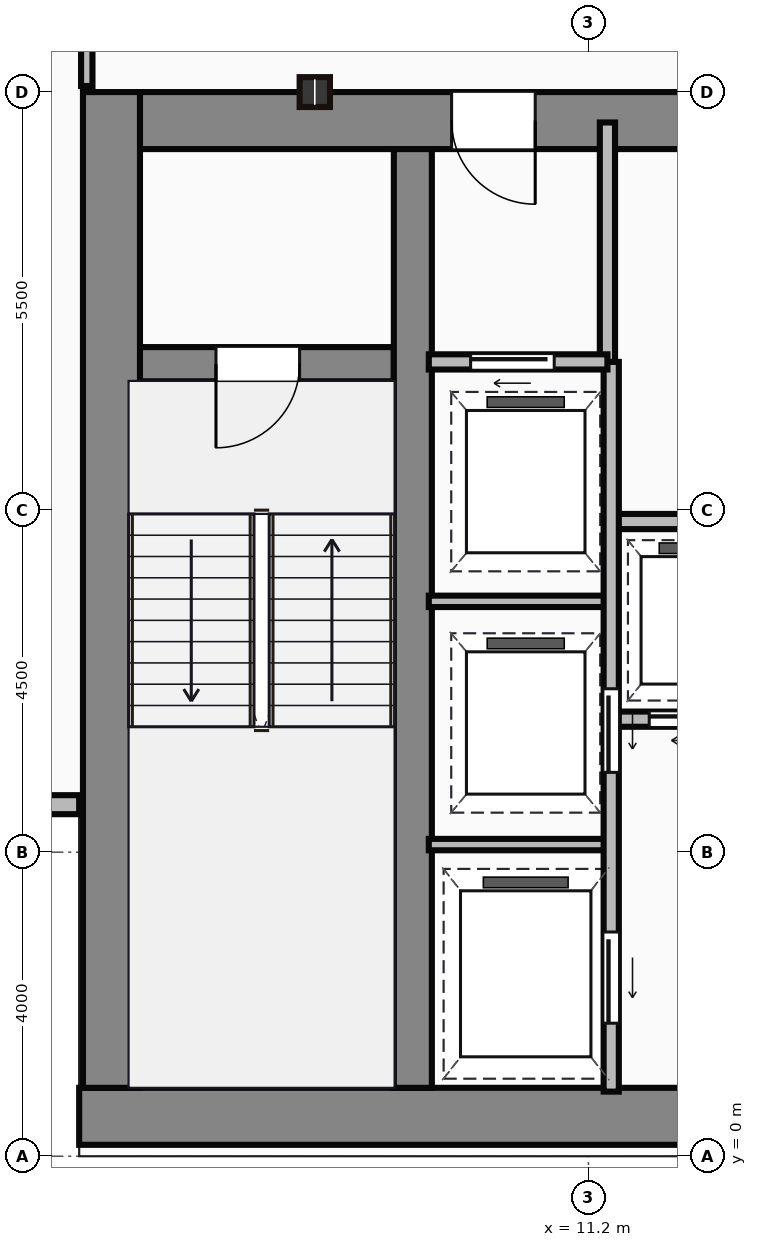
"""IFC4 building model, lengths in metres.
Left out: names, types, materials, properties, quantities, classifications, styles, units other than length and angle.
Written with IfcOpenShell. Run it as: python <this file> out.ifc"""

import sys

from ifc_helpers import new_model, si_unit, direction, frame, frame_2d, origin, origin_2d, place, context, subcontext, project, spatial, rectangle, i_section, extrude, source, transform, mapped, element, fill, save


model = new_model("IFC4")
c1 = context("Model", 3, precision=1e-05, world=origin(), true_north=direction((0.0, 1.0)))
c2 = subcontext(c1, "Body", "Model", "MODEL_VIEW")
j1 = project(units=[si_unit("LENGTHUNIT", "METRE"), si_unit("PLANEANGLEUNIT", "RADIAN")], contexts=[c1])
p1 = place(None, origin())
s1 = spatial("IfcSite", under=j1, at=p1, CompositionType="ELEMENT")
p2 = place(p1, origin())
s2 = spatial("IfcBuilding", under=s1, at=p2, CompositionType="ELEMENT")
p3 = place(p2, frame((0.0, 0.0, 125.15)))
s3 = spatial("IfcBuildingStorey", under=s2, at=p3, CompositionType="ELEMENT", Elevation=125.15)
m1 = source(origin(), c2, "Body", "SweptSolid", [
    extrude(rectangle(XDim=29.5, YDim=0.75, at=frame_2d((14.75, 0.0))), origin(), (0.0, 0.0, 1.0), 3.65),
])
p4 = place(p3, frame((4.5, 0.525, 0.0), z_axis=(0.0, 0.0, 1.0), x_axis=(1.0, 0.0, 0.0)))
e1 = element("IfcWall", 1, at=p4, inside=s3, PredefinedType="SHEAR", context=c2, shape_type="MappedRepresentation", body=[
    mapped(m1, transform((0.0, 0.0, 0.0))),
])
m2 = source(origin(), c2, "Body", "SweptSolid", [
    extrude(rectangle(XDim=13.1, YDim=0.75, at=frame_2d((6.55, 0.0))), origin(), (0.0, 0.0, 1.0), 3.65),
])
p5 = place(p3, frame((4.925, 0.9, 0.0), z_axis=(0.0, 0.0, 1.0), x_axis=(0.0, 1.0, 0.0)))
e2 = element("IfcWall", 2, at=p5, inside=s3, PredefinedType="SHEAR", context=c2, shape_type="MappedRepresentation", body=[
    mapped(m2, transform((0.0, 0.0, 0.0))),
])
m3 = source(origin(), c2, "Body", "SweptSolid", [
    extrude(rectangle(XDim=9.1, YDim=0.75, at=frame_2d((4.55, 0.0))), origin(), (0.0, 0.0, 1.0), 3.65),
])
p6 = place(p3, frame((5.3, 13.625, 0.0), z_axis=(0.0, 0.0, 1.0), x_axis=(1.0, 0.0, 0.0)))
e3 = element("IfcWall", 3, at=p6, inside=s3, PredefinedType="SHEAR", context=c2, shape_type="MappedRepresentation", body=[
    mapped(m3, transform((0.0, 0.0, 0.0))),
])
p7 = place(p6, frame((4.1, 0.0, 0.0)))
e4 = element("IfcOpeningElement", 4, at=p7, cuts=e3, PredefinedType="OPENING", context=c2, shape_type="SweptSolid", body=[
    extrude(rectangle(XDim=1.1, YDim=2.15, at=frame_2d((0.55, 1.075))), frame((0.0, 0.385, 0.0), z_axis=(0.0, -1.0, 0.0), x_axis=(1.0, 0.0, 0.0)), (0.0, 0.0, 1.0), 0.77),
])
m4 = source(origin(), c2, "Body", "SweptSolid", [
    extrude(rectangle(XDim=12.35, YDim=0.5, at=frame_2d((6.175, 0.0))), origin(), (0.0, 0.0, 1.0), 3.65),
])
p8 = place(p3, frame((8.89, 0.9, 0.0), z_axis=(0.0, 0.0, 1.0), x_axis=(0.0, 1.0, 0.0)))
e5 = element("IfcWall", 5, at=p8, inside=s3, PredefinedType="SHEAR", context=c2, shape_type="MappedRepresentation", body=[
    mapped(m4, transform((0.0, 0.0, 0.0))),
])
m5 = source(origin(), c2, "Body", "SweptSolid", [
    extrude(rectangle(XDim=3.39, YDim=0.45, at=frame_2d((1.695, 0.0))), origin(), (0.0, 0.0, 1.0), 3.65),
])
p9 = place(p3, frame((5.25, 10.42, 0.0), z_axis=(0.0, 0.0, 1.0), x_axis=(1.0, 0.0, 0.0)))
e6 = element("IfcWall", 6, at=p9, inside=s3, PredefinedType="SHEAR", context=c2, shape_type="MappedRepresentation", body=[
    mapped(m5, transform((0.0, 0.0, 0.0))),
])
p10 = place(p9, frame((1.05, 0.0, 0.0)))
e7 = element("IfcOpeningElement", 7, at=p10, cuts=e6, PredefinedType="OPENING", context=c2, shape_type="SweptSolid", body=[
    extrude(rectangle(XDim=1.1, YDim=2.15, at=frame_2d((0.55, 1.075))), frame((0.0, 0.235, 0.0), z_axis=(0.0, -1.0, 0.0), x_axis=(1.0, 0.0, 0.0)), (0.0, 0.0, 1.0), 0.47),
])
m6 = source(origin(), c2, "Body", "SweptSolid", [
    extrude(i_section(OverallWidth=0.399, OverallDepth=0.393, WebThickness=0.023, FlangeThickness=0.037, at=origin_2d()), origin(), (0.0, 0.0, 1.0), 3.65),
])
p11 = place(p3, frame((7.6, 14.0, 0.0), z_axis=(0.0, 0.0, 1.0), x_axis=(1.0, 0.0, 0.0)))
e8 = element("IfcColumn", 8, at=p11, inside=s3, PredefinedType="COLUMN", context=c2, shape_type="MappedRepresentation", body=[
    mapped(m6, transform((0.0, 0.0, 0.0))),
])
m7 = source(origin(), c2, "Body", "SweptSolid", [
    extrude(rectangle(XDim=4.5, YDim=0.25, at=frame_2d((2.25, 0.0))), origin(), (0.0, 0.0, 1.0), 3.4),
])
p12 = place(p3, frame((0.0, 4.625, 0.0), z_axis=(0.0, 0.0, 1.0), x_axis=(1.0, 0.0, 0.0)))
e9 = element("IfcWall", 9, at=p12, inside=s3, PredefinedType="STANDARD", context=c2, shape_type="MappedRepresentation", body=[
    mapped(m7, transform((0.0, 0.0, 0.0))),
])
m8 = source(origin(), c2, "Body", "SweptSolid", [
    extrude(rectangle(XDim=3.18, YDim=0.2, at=frame_2d((1.59, 0.0))), origin(), (0.0, 0.0, 1.0), 3.4),
])
p13 = place(p3, frame((11.45, 10.42, 0.0), z_axis=(0.0, 0.0, 1.0), x_axis=(0.0, 1.0, 0.0)))
e10 = element("IfcWall", 10, at=p13, inside=s3, PredefinedType="PARTITIONING", context=c2, shape_type="MappedRepresentation", body=[
    mapped(m8, transform((0.0, 0.0, 0.0))),
])
m9 = source(origin(), c2, "Body", "SweptSolid", [
    extrude(rectangle(XDim=2.35, YDim=0.2, at=frame_2d((1.175, 0.0))), origin(), (0.0, 0.0, 1.0), 3.4),
])
p14 = place(p3, frame((9.1, 10.45, 0.0), z_axis=(0.0, 0.0, 1.0), x_axis=(1.0, 0.0, 0.0)))
e11 = element("IfcWall", 11, at=p14, inside=s3, PredefinedType="PARTITIONING", context=c2, shape_type="MappedRepresentation", body=[
    mapped(m9, transform((0.0, 0.0, 0.0))),
])
p15 = place(p14, frame((0.55, 0.0, 0.0)))
e12 = element("IfcOpeningElement", 12, at=p15, cuts=e11, PredefinedType="OPENING", context=c2, shape_type="SweptSolid", body=[
    extrude(rectangle(XDim=1.1, YDim=2.15, at=frame_2d((0.55, 1.075))), frame((0.0, 0.11, 0.0), z_axis=(0.0, -1.0, 0.0), x_axis=(1.0, 0.0, 0.0)), (0.0, 0.0, 1.0), 0.22),
])
m10 = source(origin(), c2, "Body", "SweptSolid", [
    extrude(rectangle(XDim=9.6, YDim=0.2, at=frame_2d((4.8, 0.0))), origin(), (0.0, 0.0, 1.0), 3.4),
])
p16 = place(p3, frame((11.5, 0.85, 0.0), z_axis=(0.0, 0.0, 1.0), x_axis=(0.0, 1.0, 0.0)))
e13 = element("IfcWall", 13, at=p16, inside=s3, PredefinedType="PARTITIONING", context=c2, shape_type="MappedRepresentation", body=[
    mapped(m10, transform((0.0, 0.0, 0.0))),
])
p17 = place(p16, frame((4.2, 0.0, 0.0)))
e14 = element("IfcOpeningElement", 14, at=p17, cuts=e13, PredefinedType="OPENING", context=c2, shape_type="SweptSolid", body=[
    extrude(rectangle(XDim=1.1, YDim=2.15, at=frame_2d((0.55, 1.075))), frame((0.0, 0.11, 0.0), z_axis=(0.0, -1.0, 0.0), x_axis=(1.0, 0.0, 0.0)), (0.0, 0.0, 1.0), 0.22),
])
p18 = place(p16, frame((0.9, 0.0, 0.0)))
e15 = element("IfcOpeningElement", 15, at=p18, cuts=e13, PredefinedType="OPENING", context=c2, shape_type="SweptSolid", body=[
    extrude(rectangle(XDim=1.2, YDim=2.15, at=frame_2d((0.6, 1.075))), frame((0.0, 0.11, 0.0), z_axis=(0.0, -1.0, 0.0), x_axis=(1.0, 0.0, 0.0)), (0.0, 0.0, 1.0), 0.22),
])
m11 = source(origin(), c2, "Body", "SweptSolid", [
    extrude(rectangle(XDim=2.4, YDim=0.15, at=frame_2d((1.2, 0.0))), origin(), (0.0, 0.0, 1.0), 3.4),
])
for number, where, z_axis, x_axis in (
    (16, (9.1, 4.1, 0.0), (0.0, 0.0, 1.0), (1.0, 0.0, 0.0)),
    (17, (9.1, 7.3, 0.0), (0.0, 0.0, 1.0), (1.0, 0.0, 0.0)),
):
    element("IfcWall", number, at=place(p3, frame(where, z_axis=z_axis, x_axis=x_axis)), inside=s3, PredefinedType="PARTITIONING", context=c2, shape_type="MappedRepresentation", body=[
        mapped(m11, transform((0.0, 0.0, 0.0))),
    ])
m12 = source(origin(), c2, "Body", "SweptSolid", [
    extrude(rectangle(XDim=11.85, YDim=0.2, at=frame_2d((5.925, 0.0))), origin(), (0.0, 0.0, 1.0), 3.4),
])
p19 = place(p3, frame((11.55, 5.75, 0.0), z_axis=(0.0, 0.0, 1.0), x_axis=(1.0, 0.0, 0.0)))
e18 = element("IfcWall", 18, at=p19, inside=s3, PredefinedType="PARTITIONING", context=c2, shape_type="MappedRepresentation", body=[
    mapped(m12, transform((0.0, 0.0, 0.0))),
])
p20 = place(p19, frame((0.45, 0.0, 0.0)))
e19 = element("IfcOpeningElement", 19, at=p20, cuts=e18, PredefinedType="OPENING", context=c2, shape_type="SweptSolid", body=[
    extrude(rectangle(XDim=1.05, YDim=2.15, at=frame_2d((0.525, 1.075))), frame((0.0, 0.11, 0.0), z_axis=(0.0, -1.0, 0.0), x_axis=(1.0, 0.0, 0.0)), (0.0, 0.0, 1.0), 0.22),
])
p21 = place(p19, frame((2.4, 0.0, 0.0)))
e20 = element("IfcOpeningElement", 20, at=p21, cuts=e18, PredefinedType="OPENING", context=c2, shape_type="SweptSolid", body=[
    extrude(rectangle(XDim=1.05, YDim=2.15, at=frame_2d((0.525, 1.075))), frame((0.0, 0.11, 0.0), z_axis=(0.0, -1.0, 0.0), x_axis=(1.0, 0.0, 0.0)), (0.0, 0.0, 1.0), 0.22),
])
p22 = place(p19, frame((4.35, 0.0, 0.0)))
e21 = element("IfcOpeningElement", 21, at=p22, cuts=e18, PredefinedType="OPENING", context=c2, shape_type="SweptSolid", body=[
    extrude(rectangle(XDim=1.05, YDim=2.15, at=frame_2d((0.525, 1.075))), frame((0.0, 0.11, 0.0), z_axis=(0.0, -1.0, 0.0), x_axis=(1.0, 0.0, 0.0)), (0.0, 0.0, 1.0), 0.22),
])
p23 = place(p19, frame((6.3, 0.0, 0.0)))
e22 = element("IfcOpeningElement", 22, at=p23, cuts=e18, PredefinedType="OPENING", context=c2, shape_type="SweptSolid", body=[
    extrude(rectangle(XDim=1.05, YDim=2.15, at=frame_2d((0.525, 1.075))), frame((0.0, 0.11, 0.0), z_axis=(0.0, -1.0, 0.0), x_axis=(1.0, 0.0, 0.0)), (0.0, 0.0, 1.0), 0.22),
])
p24 = place(p19, frame((8.25, 0.0, 0.0)))
e23 = element("IfcOpeningElement", 23, at=p24, cuts=e18, PredefinedType="OPENING", context=c2, shape_type="SweptSolid", body=[
    extrude(rectangle(XDim=1.05, YDim=2.15, at=frame_2d((0.525, 1.075))), frame((0.0, 0.11, 0.0), z_axis=(0.0, -1.0, 0.0), x_axis=(1.0, 0.0, 0.0)), (0.0, 0.0, 1.0), 0.22),
])
p25 = place(p19, frame((10.2, 0.0, 0.0)))
e24 = element("IfcOpeningElement", 24, at=p25, cuts=e18, PredefinedType="OPENING", context=c2, shape_type="SweptSolid", body=[
    extrude(rectangle(XDim=1.05, YDim=2.15, at=frame_2d((0.525, 1.075))), frame((0.0, 0.11, 0.0), z_axis=(0.0, -1.0, 0.0), x_axis=(1.0, 0.0, 0.0)), (0.0, 0.0, 1.0), 0.22),
])
p26 = place(p3, frame((11.55, 8.35, 0.0), z_axis=(0.0, 0.0, 1.0), x_axis=(1.0, 0.0, 0.0)))
e25 = element("IfcWall", 25, at=p26, inside=s3, PredefinedType="PARTITIONING", context=c2, shape_type="MappedRepresentation", body=[
    mapped(m12, transform((0.0, 0.0, 0.0))),
])
m13 = source(origin(), c2, "Body", "SweptSolid", [
    extrude(rectangle(XDim=2.22, YDim=0.15, at=frame_2d((1.11, 0.0))), origin(), (0.0, 0.0, 1.0), 3.4),
])
p27 = place(p3, frame((4.6, 14.08, 0.0), z_axis=(0.0, 0.0, 1.0), x_axis=(0.0, 1.0, 0.0)))
e26 = element("IfcWall", 26, at=p27, inside=s3, PredefinedType="PARTITIONING", context=c2, shape_type="MappedRepresentation", body=[
    mapped(m13, transform((0.0, 0.0, 0.0))),
])
m14 = source(origin(), c2, "Body", "SweptSolid", [
    extrude(rectangle(XDim=1.1, YDim=2.15, at=frame_2d((0.55, 1.075))), frame((0.0, 0.025, 0.0), z_axis=(0.0, -1.0, 0.0), x_axis=(1.0, 0.0, 0.0)), (0.0, 0.0, 1.0), 0.05),
])
p28 = place(p10, frame((1.1, 0.0, 0.0), z_axis=(0.0, 0.0, 1.0), x_axis=(-1.0, 0.0, 0.0)))
e27 = element("IfcDoor", 27, at=p28, inside=s3, OperationType="SINGLE_SWING_LEFT", PredefinedType="DOOR", context=c2, shape_type="MappedRepresentation", body=[
    mapped(m14, transform((0.0, 0.0, 0.0))),
])
fill(e7, e27)
p29 = place(p7, origin())
e28 = element("IfcDoor", 28, at=p29, inside=s3, OperationType="SINGLE_SWING_RIGHT", PredefinedType="DOOR", context=c2, shape_type="MappedRepresentation", body=[
    mapped(m14, transform((0.0, 0.0, 0.0))),
])
fill(e4, e28)
p30 = place(p15, origin())
e29 = element("IfcDoor", 29, at=p30, inside=s3, OperationType="SLIDING_TO_LEFT", PredefinedType="DOOR", context=c2, shape_type="MappedRepresentation", body=[
    mapped(m14, transform((0.0, 0.0, 0.0))),
])
fill(e12, e29)
p31 = place(p17, frame((1.1, 0.0, 0.0), z_axis=(0.0, 0.0, 1.0), x_axis=(-1.0, 0.0, 0.0)))
e30 = element("IfcDoor", 30, at=p31, inside=s3, OperationType="SLIDING_TO_LEFT", PredefinedType="DOOR", context=c2, shape_type="MappedRepresentation", body=[
    mapped(m14, transform((0.0, 0.0, 0.0))),
])
fill(e14, e30)
m15 = source(origin(), c2, "Body", "SweptSolid", [
    extrude(rectangle(XDim=1.2, YDim=2.15, at=frame_2d((0.6, 1.075))), frame((0.0, 0.025, 0.0), z_axis=(0.0, -1.0, 0.0), x_axis=(1.0, 0.0, 0.0)), (0.0, 0.0, 1.0), 0.05),
])
p32 = place(p18, frame((1.2, 0.0, 0.0), z_axis=(0.0, 0.0, 1.0), x_axis=(-1.0, 0.0, 0.0)))
e31 = element("IfcDoor", 31, at=p32, inside=s3, OperationType="SLIDING_TO_LEFT", PredefinedType="DOOR", context=c2, shape_type="MappedRepresentation", body=[
    mapped(m15, transform((0.0, 0.0, 0.0))),
])
fill(e15, e31)
m16 = source(origin(), c2, "Body", "SweptSolid", [
    extrude(rectangle(XDim=1.05, YDim=2.15, at=frame_2d((0.525, 1.075))), frame((0.0, 0.025, 0.0), z_axis=(0.0, -1.0, 0.0), x_axis=(1.0, 0.0, 0.0)), (0.0, 0.0, 1.0), 0.05),
])
p33 = place(p20, frame((1.05, 0.0, 0.0), z_axis=(0.0, 0.0, 1.0), x_axis=(-1.0, 0.0, 0.0)))
e32 = element("IfcDoor", 32, at=p33, inside=s3, OperationType="SLIDING_TO_LEFT", PredefinedType="DOOR", context=c2, shape_type="MappedRepresentation", body=[
    mapped(m16, transform((0.0, 0.0, 0.0))),
])
fill(e19, e32)
save(model, sys.argv[1])
